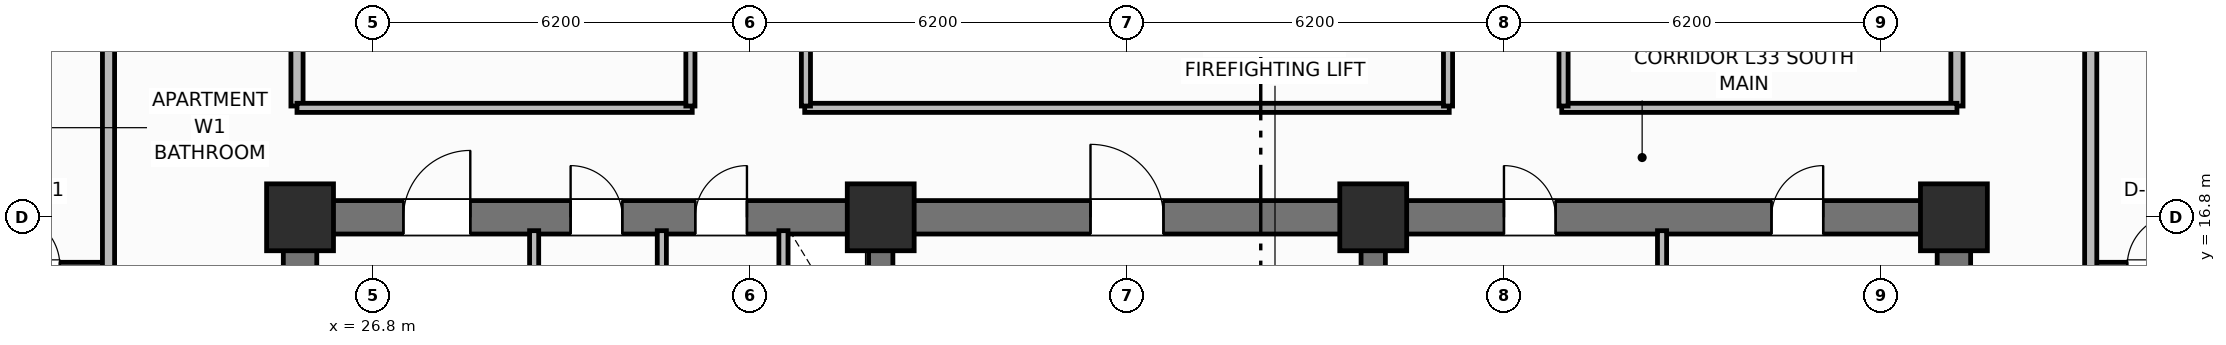
"""IFC4 building model, lengths in metres.
Left out: names, types, materials, properties, quantities, classifications, styles, units other than length and angle.
Written with IfcOpenShell. Run it as: python <this file> out.ifc"""

import sys

from ifc_helpers import new_model, si_unit, direction, frame, frame_2d, origin, origin_2d, place, context, subcontext, project, spatial, rectangle, extrude, element, fill, save


model = new_model("IFC4")
c1 = context("Model", 3, precision=1e-05, world=origin(), true_north=direction((0.0, 1.0)))
c2 = subcontext(c1, "Body", "Model", "MODEL_VIEW")
j1 = project(units=[si_unit("LENGTHUNIT", "METRE"), si_unit("PLANEANGLEUNIT", "RADIAN")], contexts=[c1])
p1 = place(None, origin())
s1 = spatial("IfcSite", under=j1, at=p1, CompositionType="ELEMENT")
p2 = place(p1, origin())
s2 = spatial("IfcBuilding", under=s1, at=p2, CompositionType="ELEMENT")
p3 = place(p2, frame((0.0, 0.0, 132.7)))
s3 = spatial("IfcBuildingStorey", under=s2, at=p3, CompositionType="ELEMENT", Elevation=132.7)
for number, where, z_axis, x_axis in (
    (1, (25.6, 10.875, 0.0), (0.0, 0.0, 1.0), (0.0, 1.0, 0.0)),
    (2, (52.8, 10.875, 0.0), (0.0, 0.0, 1.0), (0.0, 1.0, 0.0)),
):
    element("IfcWall", number, at=place(p3, frame(where, z_axis=z_axis, x_axis=x_axis)), inside=s3, PredefinedType="SHEAR", context=c2, shape_type="SweptSolid", body=[
        extrude(rectangle(XDim=5.65, YDim=0.55, at=frame_2d((2.825, 0.0))), origin(), (0.0, 0.0, 1.0), 3.7),
    ])
p4 = place(p3, frame((25.6, 16.8, 0.0), z_axis=(0.0, 0.0, 1.0), x_axis=(1.0, 0.0, 0.0)))
e3 = element("IfcWall", 3, at=p4, inside=s3, PredefinedType="SHEAR", context=c2, shape_type="SweptSolid", body=[
    extrude(rectangle(XDim=27.2, YDim=0.55, at=frame_2d((13.6, 0.0))), origin(), (0.0, 0.0, 1.0), 3.7),
])
p5 = place(p4, frame((1.7, 0.0, 0.0)))
e4 = element("IfcOpeningElement", 4, at=p5, cuts=e3, PredefinedType="OPENING", context=c2, shape_type="SweptSolid", body=[
    extrude(rectangle(XDim=1.1, YDim=2.15, at=frame_2d((0.55, 1.075))), frame((0.0, 0.285, 0.0), z_axis=(0.0, -1.0, 0.0), x_axis=(1.0, 0.0, 0.0)), (0.0, 0.0, 1.0), 0.57),
])
p6 = place(p4, frame((4.45, 0.0, 0.0)))
e5 = element("IfcOpeningElement", 5, at=p6, cuts=e3, PredefinedType="OPENING", context=c2, shape_type="SweptSolid", body=[
    extrude(rectangle(XDim=0.85, YDim=2.1, at=frame_2d((0.425, 1.05))), frame((0.0, 0.285, 0.0), z_axis=(0.0, -1.0, 0.0), x_axis=(1.0, 0.0, 0.0)), (0.0, 0.0, 1.0), 0.57),
])
p7 = place(p4, frame((6.5, 0.0, 0.0)))
e6 = element("IfcOpeningElement", 6, at=p7, cuts=e3, PredefinedType="OPENING", context=c2, shape_type="SweptSolid", body=[
    extrude(rectangle(XDim=0.85, YDim=2.1, at=frame_2d((0.425, 1.05))), frame((0.0, 0.285, 0.0), z_axis=(0.0, -1.0, 0.0), x_axis=(1.0, 0.0, 0.0)), (0.0, 0.0, 1.0), 0.57),
])
p8 = place(p4, frame((13.0, 0.0, 0.0)))
e7 = element("IfcOpeningElement", 7, at=p8, cuts=e3, PredefinedType="OPENING", context=c2, shape_type="SweptSolid", body=[
    extrude(rectangle(XDim=1.2, YDim=2.15, at=frame_2d((0.6, 1.075))), frame((0.0, 0.285, 0.0), z_axis=(0.0, -1.0, 0.0), x_axis=(1.0, 0.0, 0.0)), (0.0, 0.0, 1.0), 0.57),
])
p9 = place(p4, frame((19.8, 0.0, 0.0)))
e8 = element("IfcOpeningElement", 8, at=p9, cuts=e3, PredefinedType="OPENING", context=c2, shape_type="SweptSolid", body=[
    extrude(rectangle(XDim=0.85, YDim=2.1, at=frame_2d((0.425, 1.05))), frame((0.0, 0.285, 0.0), z_axis=(0.0, -1.0, 0.0), x_axis=(1.0, 0.0, 0.0)), (0.0, 0.0, 1.0), 0.57),
])
p10 = place(p4, frame((24.2, 0.0, 0.0)))
e9 = element("IfcOpeningElement", 9, at=p10, cuts=e3, PredefinedType="OPENING", context=c2, shape_type="SweptSolid", body=[
    extrude(rectangle(XDim=0.85, YDim=2.1, at=frame_2d((0.425, 1.05))), frame((0.0, 0.285, 0.0), z_axis=(0.0, -1.0, 0.0), x_axis=(1.0, 0.0, 0.0)), (0.0, 0.0, 1.0), 0.57),
])
for number, where, z_axis, x_axis in (
    (10, (35.15, 10.875, 0.0), (0.0, 0.0, 1.0), (0.0, 1.0, 0.0)),
    (11, (43.25, 10.875, 0.0), (0.0, 0.0, 1.0), (0.0, 1.0, 0.0)),
):
    element("IfcWall", number, at=place(p3, frame(where, z_axis=z_axis, x_axis=x_axis)), inside=s3, PredefinedType="SHEAR", context=c2, shape_type="SweptSolid", body=[
        extrude(rectangle(XDim=5.65, YDim=0.4, at=frame_2d((2.825, 0.0))), origin(), (0.0, 0.0, 1.0), 3.7),
    ])
for number, where, z_axis, x_axis in (
    (12, (25.6, 16.8, 0.0), (0.0, 0.0, 1.0), (1.0, 0.0, 0.0)),
    (13, (35.15, 16.8, 0.0), (0.0, 0.0, 1.0), (1.0, 0.0, 0.0)),
    (14, (43.25, 16.8, 0.0), (0.0, 0.0, 1.0), (1.0, 0.0, 0.0)),
    (15, (52.8, 16.8, 0.0), (0.0, 0.0, 1.0), (1.0, 0.0, 0.0)),
):
    element("IfcColumn", number, at=place(p3, frame(where, z_axis=z_axis, x_axis=x_axis)), inside=s3, PredefinedType="COLUMN", context=c2, shape_type="SweptSolid", body=[
        extrude(rectangle(XDim=1.1, YDim=1.1, at=origin_2d()), origin(), (0.0, 0.0, 1.0), 3.7),
    ])
for number, where, z_axis, x_axis in (
    (16, (29.45, 14.5, 0.0), (0.0, 0.0, 1.0), (0.0, 1.0, 0.0)),
    (17, (31.55, 14.5, 0.0), (0.0, 0.0, 1.0), (0.0, 1.0, 0.0)),
):
    element("IfcWall", number, at=place(p3, frame(where, z_axis=z_axis, x_axis=x_axis)), inside=s3, PredefinedType="PARTITIONING", context=c2, shape_type="SweptSolid", body=[
        extrude(rectangle(XDim=2.08, YDim=0.15, at=frame_2d((1.04, 0.0))), origin(), (0.0, 0.0, 1.0), 2.49),
    ])
p11 = place(p3, frame((33.55, 14.5, 0.0), z_axis=(0.0, 0.0, 1.0), x_axis=(0.0, 1.0, 0.0)))
e18 = element("IfcWall", 18, at=p11, inside=s3, PredefinedType="PARTITIONING", context=c2, shape_type="SweptSolid", body=[
    extrude(rectangle(XDim=2.08, YDim=0.15, at=frame_2d((1.04, 0.0))), origin(), (0.0, 0.0, 1.0), 2.49),
])
p12 = place(p11, frame((0.55, 0.0, 0.0)))
e19 = element("IfcOpeningElement", 19, at=p12, cuts=e18, PredefinedType="OPENING", context=c2, shape_type="SweptSolid", body=[
    extrude(rectangle(XDim=0.85, YDim=2.05, at=frame_2d((0.425, 1.025))), frame((0.0, 0.085, 0.0), z_axis=(0.0, -1.0, 0.0), x_axis=(1.0, 0.0, 0.0)), (0.0, 0.0, 1.0), 0.17),
])
p13 = place(p3, frame((48.0, 10.95, 0.0), z_axis=(0.0, 0.0, 1.0), x_axis=(0.0, 1.0, 0.0)))
e20 = element("IfcWall", 20, at=p13, inside=s3, PredefinedType="PARTITIONING", context=c2, shape_type="SweptSolid", body=[
    extrude(rectangle(XDim=5.63, YDim=0.15, at=frame_2d((2.815, 0.0))), origin(), (0.0, 0.0, 1.0), 2.49),
])
for number, where, z_axis, x_axis in (
    (21, (25.55, 18.63, 0.0), (0.0, 0.0, 1.0), (0.0, 1.0, 0.0)),
    (22, (52.85, 18.63, 0.0), (0.0, 0.0, 1.0), (0.0, 1.0, 0.0)),
):
    element("IfcWall", number, at=place(p3, frame(where, z_axis=z_axis, x_axis=x_axis)), inside=s3, PredefinedType="PARTITIONING", context=c2, shape_type="SweptSolid", body=[
        extrude(rectangle(XDim=19.14, YDim=0.2, at=frame_2d((9.57, 0.0))), origin(), (0.0, 0.0, 1.0), 2.49),
    ])
p14 = place(p3, frame((25.55, 18.6, 0.0), z_axis=(0.0, 0.0, 1.0), x_axis=(1.0, 0.0, 0.0)))
e23 = element("IfcWall", 23, at=p14, inside=s3, PredefinedType="PARTITIONING", context=c2, shape_type="SweptSolid", body=[
    extrude(rectangle(XDim=6.5, YDim=0.15, at=frame_2d((3.25, 0.0))), origin(), (0.0, 0.0, 1.0), 2.49),
])
p15 = place(p3, frame((33.9, 18.6, 0.0), z_axis=(0.0, 0.0, 1.0), x_axis=(1.0, 0.0, 0.0)))
e24 = element("IfcWall", 24, at=p15, inside=s3, PredefinedType="PARTITIONING", context=c2, shape_type="SweptSolid", body=[
    extrude(rectangle(XDim=10.6, YDim=0.15, at=frame_2d((5.3, 0.0))), origin(), (0.0, 0.0, 1.0), 2.49),
])
p16 = place(p3, frame((46.35, 18.6, 0.0), z_axis=(0.0, 0.0, 1.0), x_axis=(1.0, 0.0, 0.0)))
e25 = element("IfcWall", 25, at=p16, inside=s3, PredefinedType="PARTITIONING", context=c2, shape_type="SweptSolid", body=[
    extrude(rectangle(XDim=6.5, YDim=0.15, at=frame_2d((3.25, 0.0))), origin(), (0.0, 0.0, 1.0), 2.49),
])
p17 = place(p3, frame((32.02, 18.63, 0.0), z_axis=(0.0, 0.0, 1.0), x_axis=(0.0, 1.0, 0.0)))
e26 = element("IfcWall", 26, at=p17, inside=s3, PredefinedType="PARTITIONING", context=c2, shape_type="SweptSolid", body=[
    extrude(rectangle(XDim=19.14, YDim=0.15, at=frame_2d((9.57, 0.0))), origin(), (0.0, 0.0, 1.0), 2.49),
])
p18 = place(p17, frame((5.0, 0.0, 0.0)))
e27 = element("IfcOpeningElement", 27, at=p18, cuts=e26, PredefinedType="OPENING", context=c2, shape_type="SweptSolid", body=[
    extrude(rectangle(XDim=0.9, YDim=2.1, at=frame_2d((0.45, 1.05))), frame((0.0, 0.085, 0.0), z_axis=(0.0, -1.0, 0.0), x_axis=(1.0, 0.0, 0.0)), (0.0, 0.0, 1.0), 0.17),
])
p19 = place(p3, frame((33.92, 18.63, 0.0), z_axis=(0.0, 0.0, 1.0), x_axis=(0.0, 1.0, 0.0)))
e28 = element("IfcWall", 28, at=p19, inside=s3, PredefinedType="PARTITIONING", context=c2, shape_type="SweptSolid", body=[
    extrude(rectangle(XDim=19.14, YDim=0.15, at=frame_2d((9.57, 0.0))), origin(), (0.0, 0.0, 1.0), 2.49),
])
p20 = place(p19, frame((6.5, 0.0, 0.0)))
e29 = element("IfcOpeningElement", 29, at=p20, cuts=e28, PredefinedType="OPENING", context=c2, shape_type="SweptSolid", body=[
    extrude(rectangle(XDim=1.0, YDim=2.15, at=frame_2d((0.5, 1.075))), frame((0.0, 0.085, 0.0), z_axis=(0.0, -1.0, 0.0), x_axis=(1.0, 0.0, 0.0)), (0.0, 0.0, 1.0), 0.17),
])
p21 = place(p3, frame((44.48, 18.63, 0.0), z_axis=(0.0, 0.0, 1.0), x_axis=(0.0, 1.0, 0.0)))
e30 = element("IfcWall", 30, at=p21, inside=s3, PredefinedType="PARTITIONING", context=c2, shape_type="SweptSolid", body=[
    extrude(rectangle(XDim=19.14, YDim=0.15, at=frame_2d((9.57, 0.0))), origin(), (0.0, 0.0, 1.0), 2.49),
])
p22 = place(p3, frame((46.38, 18.63, 0.0), z_axis=(0.0, 0.0, 1.0), x_axis=(0.0, 1.0, 0.0)))
e31 = element("IfcWall", 31, at=p22, inside=s3, PredefinedType="PARTITIONING", context=c2, shape_type="SweptSolid", body=[
    extrude(rectangle(XDim=19.14, YDim=0.15, at=frame_2d((9.57, 0.0))), origin(), (0.0, 0.0, 1.0), 2.49),
])
p23 = place(p22, frame((3.0, 0.0, 0.0)))
e32 = element("IfcOpeningElement", 32, at=p23, cuts=e31, PredefinedType="OPENING", context=c2, shape_type="SweptSolid", body=[
    extrude(rectangle(XDim=0.9, YDim=2.1, at=frame_2d((0.45, 1.05))), frame((0.0, 0.085, 0.0), z_axis=(0.0, -1.0, 0.0), x_axis=(1.0, 0.0, 0.0)), (0.0, 0.0, 1.0), 0.17),
])
p24 = place(p22, frame((11.5, 0.0, 0.0)))
e33 = element("IfcOpeningElement", 33, at=p24, cuts=e31, PredefinedType="OPENING", context=c2, shape_type="SweptSolid", body=[
    extrude(rectangle(XDim=0.9, YDim=2.1, at=frame_2d((0.45, 1.05))), frame((0.0, 0.085, 0.0), z_axis=(0.0, -1.0, 0.0), x_axis=(1.0, 0.0, 0.0)), (0.0, 0.0, 1.0), 0.17),
])
p25 = place(p3, frame((20.2, 16.0, 0.0), z_axis=(0.0, 0.0, 1.0), x_axis=(1.0, 0.0, 0.0)))
e34 = element("IfcWall", 34, at=p25, inside=s3, PredefinedType="PARTITIONING", context=c2, shape_type="SweptSolid", body=[
    extrude(rectangle(XDim=2.25, YDim=0.12, at=frame_2d((1.125, 0.0))), origin(), (0.0, 0.0, 1.0), 2.49),
])
p26 = place(p25, frame((0.6, 0.0, 0.0)))
e35 = element("IfcOpeningElement", 35, at=p26, cuts=e34, PredefinedType="OPENING", context=c2, shape_type="SweptSolid", body=[
    extrude(rectangle(XDim=0.85, YDim=2.1, at=frame_2d((0.425, 1.05))), frame((0.0, 0.07, 0.0), z_axis=(0.0, -1.0, 0.0), x_axis=(1.0, 0.0, 0.0)), (0.0, 0.0, 1.0), 0.14),
])
p27 = place(p3, frame((22.45, 10.6, 0.0), z_axis=(0.0, 0.0, 1.0), x_axis=(0.0, 1.0, 0.0)))
e36 = element("IfcWall", 36, at=p27, inside=s3, PredefinedType="PARTITIONING", context=c2, shape_type="SweptSolid", body=[
    extrude(rectangle(XDim=35.2, YDim=0.2, at=frame_2d((17.6, 0.0))), origin(), (0.0, 0.0, 1.0), 2.49),
])
p28 = place(p27, frame((2.65, 0.0, 0.0)))
e37 = element("IfcOpeningElement", 37, at=p28, cuts=e36, PredefinedType="OPENING", context=c2, shape_type="SweptSolid", body=[
    extrude(rectangle(XDim=1.0, YDim=2.15, at=frame_2d((0.5, 1.075))), frame((0.0, 0.11, 0.0), z_axis=(0.0, -1.0, 0.0), x_axis=(1.0, 0.0, 0.0)), (0.0, 0.0, 1.0), 0.22),
])
p29 = place(p27, frame((19.95, 0.0, 0.0)))
e38 = element("IfcOpeningElement", 38, at=p29, cuts=e36, PredefinedType="OPENING", context=c2, shape_type="SweptSolid", body=[
    extrude(rectangle(XDim=1.0, YDim=2.15, at=frame_2d((0.5, 1.075))), frame((0.0, 0.11, 0.0), z_axis=(0.0, -1.0, 0.0), x_axis=(1.0, 0.0, 0.0)), (0.0, 0.0, 1.0), 0.22),
])
p30 = place(p3, frame((55.05, 16.0, 0.0), z_axis=(0.0, 0.0, 1.0), x_axis=(1.0, 0.0, 0.0)))
e39 = element("IfcWall", 39, at=p30, inside=s3, PredefinedType="PARTITIONING", context=c2, shape_type="SweptSolid", body=[
    extrude(rectangle(XDim=2.25, YDim=0.12, at=frame_2d((1.125, 0.0))), origin(), (0.0, 0.0, 1.0), 2.49),
])
p31 = place(p30, frame((0.6, 0.0, 0.0)))
e40 = element("IfcOpeningElement", 40, at=p31, cuts=e39, PredefinedType="OPENING", context=c2, shape_type="SweptSolid", body=[
    extrude(rectangle(XDim=0.85, YDim=2.1, at=frame_2d((0.425, 1.05))), frame((0.0, 0.07, 0.0), z_axis=(0.0, -1.0, 0.0), x_axis=(1.0, 0.0, 0.0)), (0.0, 0.0, 1.0), 0.14),
])
p32 = place(p3, frame((55.05, 10.6, 0.0), z_axis=(0.0, 0.0, 1.0), x_axis=(0.0, 1.0, 0.0)))
e41 = element("IfcWall", 41, at=p32, inside=s3, PredefinedType="PARTITIONING", context=c2, shape_type="SweptSolid", body=[
    extrude(rectangle(XDim=35.2, YDim=0.2, at=frame_2d((17.6, 0.0))), origin(), (0.0, 0.0, 1.0), 2.49),
])
p33 = place(p32, frame((2.65, 0.0, 0.0)))
e42 = element("IfcOpeningElement", 42, at=p33, cuts=e41, PredefinedType="OPENING", context=c2, shape_type="SweptSolid", body=[
    extrude(rectangle(XDim=1.0, YDim=2.15, at=frame_2d((0.5, 1.075))), frame((0.0, 0.11, 0.0), z_axis=(0.0, -1.0, 0.0), x_axis=(1.0, 0.0, 0.0)), (0.0, 0.0, 1.0), 0.22),
])
p34 = place(p32, frame((22.75, 0.0, 0.0)))
e43 = element("IfcOpeningElement", 43, at=p34, cuts=e41, PredefinedType="OPENING", context=c2, shape_type="SweptSolid", body=[
    extrude(rectangle(XDim=1.0, YDim=2.15, at=frame_2d((0.5, 1.075))), frame((0.0, 0.11, 0.0), z_axis=(0.0, -1.0, 0.0), x_axis=(1.0, 0.0, 0.0)), (0.0, 0.0, 1.0), 0.22),
])
p35 = place(p26, origin())
e44 = element("IfcDoor", 44, at=p35, inside=s3, OperationType="SINGLE_SWING_LEFT", PredefinedType="DOOR", context=c2, shape_type="SweptSolid", body=[
    extrude(rectangle(XDim=0.85, YDim=2.1, at=frame_2d((0.425, 1.05))), frame((0.0, 0.025, 0.0), z_axis=(0.0, -1.0, 0.0), x_axis=(1.0, 0.0, 0.0)), (0.0, 0.0, 1.0), 0.05),
])
fill(e35, e44)
p36 = place(p31, origin())
e45 = element("IfcDoor", 45, at=p36, inside=s3, OperationType="SINGLE_SWING_RIGHT", PredefinedType="DOOR", context=c2, shape_type="SweptSolid", body=[
    extrude(rectangle(XDim=0.85, YDim=2.1, at=frame_2d((0.425, 1.05))), frame((0.0, 0.025, 0.0), z_axis=(0.0, -1.0, 0.0), x_axis=(1.0, 0.0, 0.0)), (0.0, 0.0, 1.0), 0.05),
])
fill(e40, e45)
p37 = place(p5, origin())
e46 = element("IfcDoor", 46, at=p37, inside=s3, OperationType="SINGLE_SWING_RIGHT", PredefinedType="DOOR", context=c2, shape_type="SweptSolid", body=[
    extrude(rectangle(XDim=1.1, YDim=2.15, at=frame_2d((0.55, 1.075))), frame((0.0, 0.025, 0.0), z_axis=(0.0, -1.0, 0.0), x_axis=(1.0, 0.0, 0.0)), (0.0, 0.0, 1.0), 0.05),
])
fill(e4, e46)
p38 = place(p6, origin())
e47 = element("IfcDoor", 47, at=p38, inside=s3, OperationType="SINGLE_SWING_LEFT", PredefinedType="DOOR", context=c2, shape_type="SweptSolid", body=[
    extrude(rectangle(XDim=0.85, YDim=2.1, at=frame_2d((0.425, 1.05))), frame((0.0, 0.025, 0.0), z_axis=(0.0, -1.0, 0.0), x_axis=(1.0, 0.0, 0.0)), (0.0, 0.0, 1.0), 0.05),
])
fill(e5, e47)
p39 = place(p7, origin())
e48 = element("IfcDoor", 48, at=p39, inside=s3, OperationType="SINGLE_SWING_RIGHT", PredefinedType="DOOR", context=c2, shape_type="SweptSolid", body=[
    extrude(rectangle(XDim=0.85, YDim=2.1, at=frame_2d((0.425, 1.05))), frame((0.0, 0.025, 0.0), z_axis=(0.0, -1.0, 0.0), x_axis=(1.0, 0.0, 0.0)), (0.0, 0.0, 1.0), 0.05),
])
fill(e6, e48)
p40 = place(p8, origin())
e49 = element("IfcDoor", 49, at=p40, inside=s3, OperationType="SINGLE_SWING_LEFT", PredefinedType="DOOR", context=c2, shape_type="SweptSolid", body=[
    extrude(rectangle(XDim=1.2, YDim=2.15, at=frame_2d((0.6, 1.075))), frame((0.0, 0.025, 0.0), z_axis=(0.0, -1.0, 0.0), x_axis=(1.0, 0.0, 0.0)), (0.0, 0.0, 1.0), 0.05),
])
fill(e7, e49)
p41 = place(p9, origin())
e50 = element("IfcDoor", 50, at=p41, inside=s3, OperationType="SINGLE_SWING_LEFT", PredefinedType="DOOR", context=c2, shape_type="SweptSolid", body=[
    extrude(rectangle(XDim=0.85, YDim=2.1, at=frame_2d((0.425, 1.05))), frame((0.0, 0.025, 0.0), z_axis=(0.0, -1.0, 0.0), x_axis=(1.0, 0.0, 0.0)), (0.0, 0.0, 1.0), 0.05),
])
fill(e8, e50)
p42 = place(p10, origin())
e51 = element("IfcDoor", 51, at=p42, inside=s3, OperationType="SINGLE_SWING_RIGHT", PredefinedType="DOOR", context=c2, shape_type="SweptSolid", body=[
    extrude(rectangle(XDim=0.85, YDim=2.1, at=frame_2d((0.425, 1.05))), frame((0.0, 0.025, 0.0), z_axis=(0.0, -1.0, 0.0), x_axis=(1.0, 0.0, 0.0)), (0.0, 0.0, 1.0), 0.05),
])
fill(e9, e51)
save(model, sys.argv[1])
